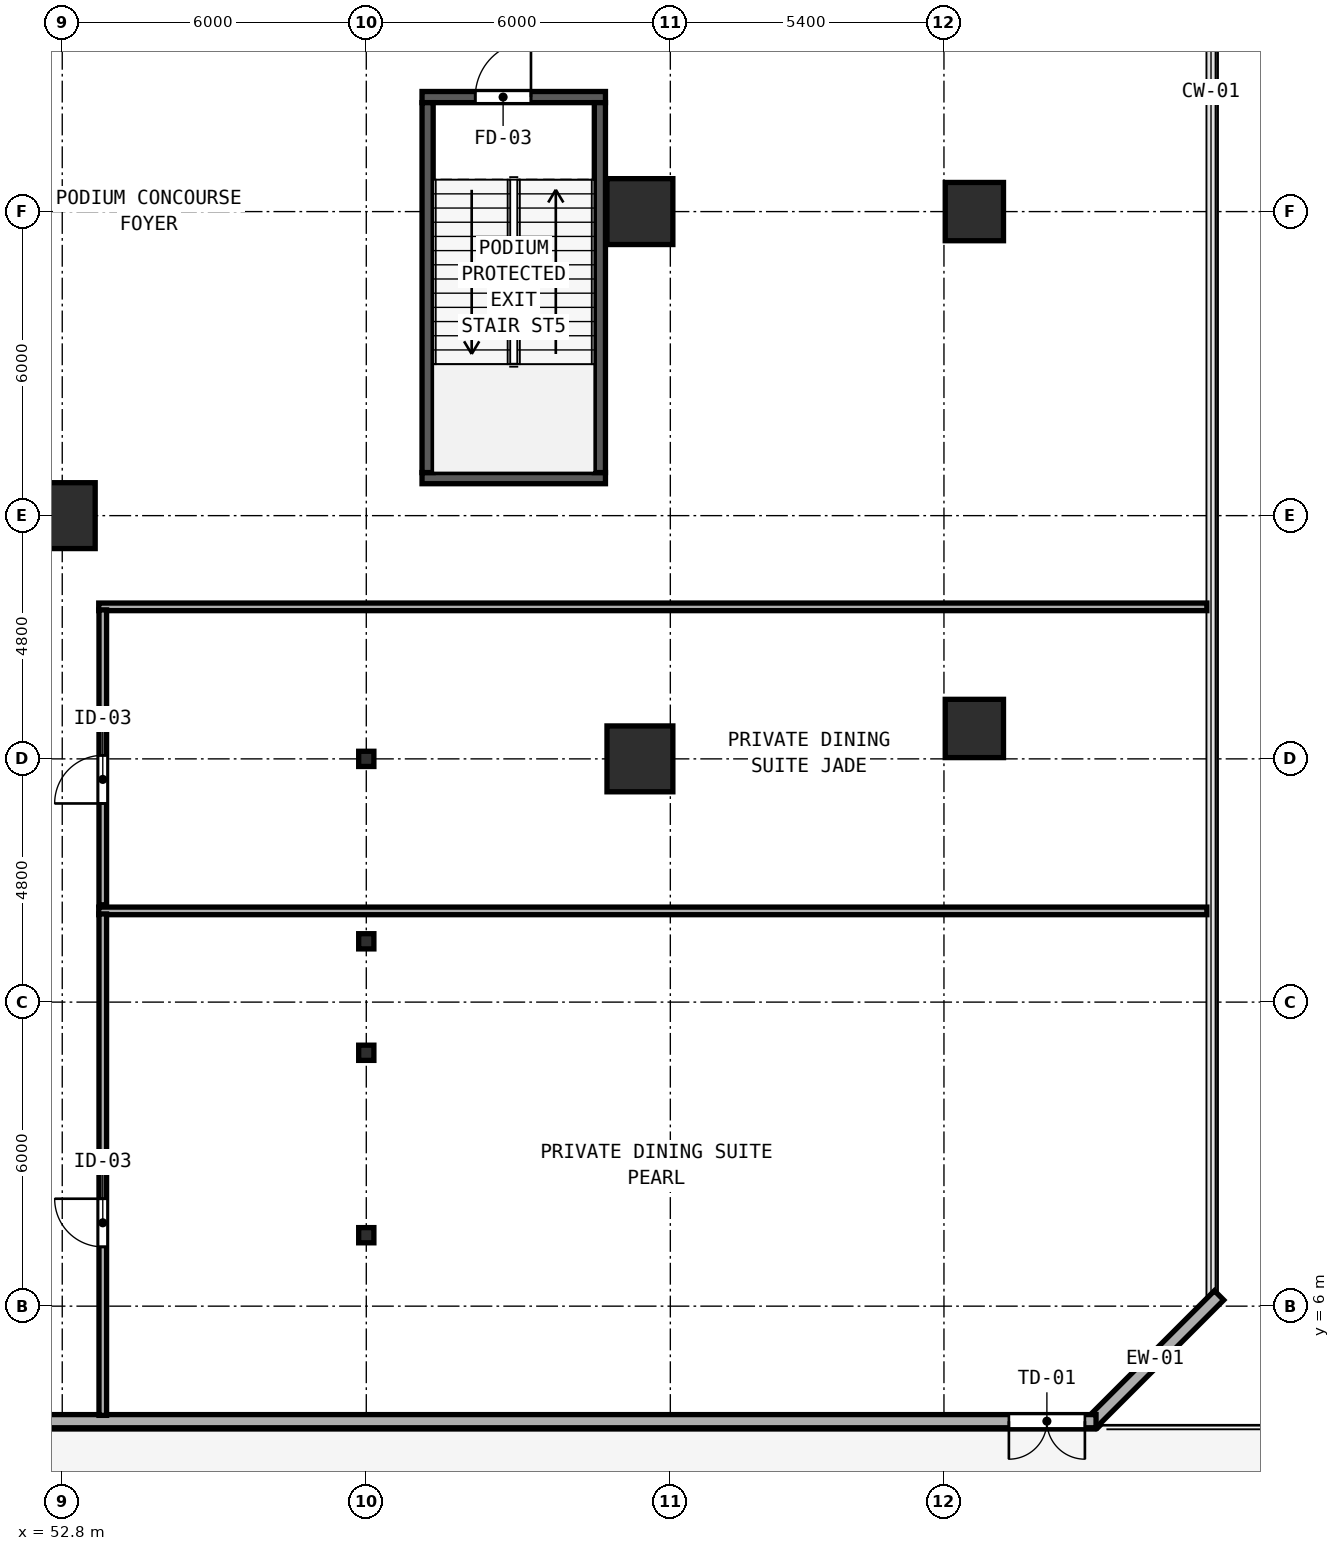
"""IFC4 building model, lengths in metres.
Left out: names, types, materials, properties, quantities, classifications, styles, units other than length and angle.
Written with IfcOpenShell. Run it as: python <this file> out.ifc"""

import sys

from ifc_helpers import new_model, si_unit, direction, frame, frame_2d, origin, origin_2d, place, context, subcontext, project, spatial, rectangle, hollow_rectangle, i_section, extrude, element, fill, save


model = new_model("IFC4")
c1 = context("Model", 3, precision=1e-05, world=origin(), true_north=direction((0.0, 1.0)))
c2 = subcontext(c1, "Body", "Model", "MODEL_VIEW")
j1 = project(units=[si_unit("LENGTHUNIT", "METRE"), si_unit("PLANEANGLEUNIT", "RADIAN")], contexts=[c1])
p1 = place(None, origin())
s1 = spatial("IfcSite", under=j1, at=p1, CompositionType="ELEMENT")
p2 = place(p1, origin())
s2 = spatial("IfcBuilding", under=s1, at=p2, CompositionType="ELEMENT")
p3 = place(p2, frame((0.0, 0.0, 5.4)))
s3 = spatial("IfcBuildingStorey", under=s2, at=p3, CompositionType="ELEMENT", Elevation=5.4)
p4 = place(p3, frame((59.9, 29.86, 0.0), z_axis=(0.0, 0.0, 1.0), x_axis=(1.0, 0.0, 0.0)))
e1 = element("IfcWall", 1, at=p4, inside=s3, PredefinedType="SHEAR", context=c2, shape_type="SweptSolid", body=[
    extrude(rectangle(XDim=3.62, YDim=0.22, at=frame_2d((1.81, 0.0))), origin(), (0.0, 0.0, 1.0), 4.56),
])
p5 = place(p4, frame((1.05, 0.0, 0.0)))
e2 = element("IfcOpeningElement", 2, at=p5, cuts=e1, PredefinedType="OPENING", context=c2, shape_type="SweptSolid", body=[
    extrude(rectangle(XDim=1.1, YDim=2.15, at=frame_2d((0.55, 1.075))), frame((0.0, 0.12, 0.0), z_axis=(0.0, -1.0, 0.0), x_axis=(1.0, 0.0, 0.0)), (0.0, 0.0, 1.0), 0.24),
])
p6 = place(p3, frame((59.9, 22.34, 0.0), z_axis=(0.0, 0.0, 1.0), x_axis=(1.0, 0.0, 0.0)))
e3 = element("IfcWall", 3, at=p6, inside=s3, PredefinedType="SHEAR", context=c2, shape_type="SweptSolid", body=[
    extrude(rectangle(XDim=3.62, YDim=0.22, at=frame_2d((1.81, 0.0))), origin(), (0.0, 0.0, 1.0), 4.56),
])
for number, where, z_axis, x_axis in (
    (4, (60.01, 22.45, 0.0), (0.0, 0.0, 1.0), (0.0, 1.0, 0.0)),
    (5, (63.41, 22.45, 0.0), (0.0, 0.0, 1.0), (0.0, 1.0, 0.0)),
):
    element("IfcWall", number, at=place(p3, frame(where, z_axis=z_axis, x_axis=x_axis)), inside=s3, PredefinedType="SHEAR", context=c2, shape_type="SweptSolid", body=[
        extrude(rectangle(XDim=7.3, YDim=0.22, at=frame_2d((3.65, 0.0))), origin(), (0.0, 0.0, 1.0), 4.56),
    ])
for number, where, z_axis, x_axis in (
    (6, (52.8, 21.6, 0.0), (0.0, 0.0, 1.0), (1.0, 0.0, 0.0)),
    (7, (64.2, 16.8, 0.0), (0.0, 0.0, 1.0), (1.0, 0.0, 0.0)),
    (8, (64.2, 27.6, 0.0), (0.0, 0.0, 1.0), (1.0, 0.0, 0.0)),
):
    element("IfcColumn", number, at=place(p3, frame(where, z_axis=z_axis, x_axis=x_axis)), inside=s3, PredefinedType="COLUMN", context=c2, shape_type="SweptSolid", body=[
        extrude(hollow_rectangle(XDim=1.3, YDim=1.3, WallThickness=0.048, at=origin_2d()), origin(), (0.0, 0.0, 1.0), 4.8),
    ])
for number, where, z_axis, x_axis in (
    (9, (70.8, 17.4, 0.0), (0.0, 0.0, 1.0), (1.0, 0.0, 0.0)),
    (10, (70.8, 27.6, 0.0), (0.0, 0.0, 1.0), (1.0, 0.0, 0.0)),
):
    element("IfcColumn", number, at=place(p3, frame(where, z_axis=z_axis, x_axis=x_axis)), inside=s3, PredefinedType="COLUMN", context=c2, shape_type="SweptSolid", body=[
        extrude(hollow_rectangle(XDim=1.15, YDim=1.15, WallThickness=0.042, at=origin_2d()), origin(), (0.0, 0.0, 1.0), 4.8),
    ])
for number, where, z_axis, x_axis in (
    (11, (58.8, 7.4, 0.0), (0.0, 0.0, 1.0), (1.0, 0.0, 0.0)),
    (12, (58.8, 11.0, 0.0), (0.0, 0.0, 1.0), (1.0, 0.0, 0.0)),
    (13, (58.8, 13.2, 0.0), (0.0, 0.0, 1.0), (1.0, 0.0, 0.0)),
    (14, (58.8, 16.8, 0.0), (0.0, 0.0, 1.0), (1.0, 0.0, 0.0)),
):
    element("IfcColumn", number, at=place(p3, frame(where, z_axis=z_axis, x_axis=x_axis)), inside=s3, PredefinedType="COLUMN", context=c2, shape_type="SweptSolid", body=[
        extrude(i_section(OverallWidth=0.3, OverallDepth=0.3, WebThickness=0.01, FlangeThickness=0.015, FilletRadius=0.018, at=origin_2d()), origin(), (0.0, 0.0, 1.0), 4.8),
    ])
p7 = place(p3, frame((73.107, 3.691, 0.0), z_axis=(0.0, 0.0, 1.0), x_axis=(0.707106781187, 0.707106781187, 0.0)))
e15 = element("IfcWall", 15, at=p7, inside=s3, PredefinedType="SOLIDWALL", context=c2, shape_type="SweptSolid", body=[
    extrude(rectangle(XDim=3.566, YDim=0.26, at=frame_2d((1.783, 0.0))), origin(), (0.0, 0.0, 1.0), 4.56),
])
p8 = place(p3, frame((3.599, 3.73, 0.0), z_axis=(0.0, 0.0, 1.0), x_axis=(1.0, 0.0, 0.0)))
e16 = element("IfcWall", 16, at=p8, inside=s3, PredefinedType="SOLIDWALL", context=c2, shape_type="SweptSolid", body=[
    extrude(rectangle(XDim=69.602, YDim=0.26, at=frame_2d((34.801, 0.0))), origin(), (0.0, 0.0, 1.0), 4.56),
])
p9 = place(p8, frame((69.382, 0.0, 0.0), z_axis=(0.0, 0.0, 1.0), x_axis=(-1.0, 0.0, 0.0)))
e17 = element("IfcOpeningElement", 17, at=p9, cuts=e16, PredefinedType="OPENING", context=c2, shape_type="SweptSolid", body=[
    extrude(rectangle(XDim=1.5, YDim=2.2, at=frame_2d((0.75, 1.1))), frame((0.0, 0.14, 0.0), z_axis=(0.0, -1.0, 0.0), x_axis=(1.0, 0.0, 0.0)), (0.0, 0.0, 1.0), 0.28),
])
p10 = place(p3, frame((53.52, 13.8, 0.0), z_axis=(0.0, 0.0, 1.0), x_axis=(1.0, 0.0, 0.0)))
e18 = element("IfcWall", 18, at=p10, inside=s3, PredefinedType="PARTITIONING", context=c2, shape_type="SweptSolid", body=[
    extrude(rectangle(XDim=21.868, YDim=0.15, at=frame_2d((10.934, 0.0))), origin(), (0.0, 0.0, 1.0), 4.56),
])
p11 = place(p3, frame((53.6, 3.845, 0.0), z_axis=(0.0, 0.0, 1.0), x_axis=(0.0, 1.0, 0.0)))
e19 = element("IfcWall", 19, at=p11, inside=s3, PredefinedType="PARTITIONING", context=c2, shape_type="SweptSolid", body=[
    extrude(rectangle(XDim=9.895, YDim=0.15, at=frame_2d((4.948, 0.0))), origin(), (0.0, 0.0, 1.0), 4.56),
])
p12 = place(p11, frame((3.325, 0.0, 0.0)))
e20 = element("IfcOpeningElement", 20, at=p12, cuts=e19, PredefinedType="OPENING", context=c2, shape_type="SweptSolid", body=[
    extrude(rectangle(XDim=0.95, YDim=2.12, at=frame_2d((0.475, 1.06))), frame((0.0, 0.085, 0.0), z_axis=(0.0, -1.0, 0.0), x_axis=(1.0, 0.0, 0.0)), (0.0, 0.0, 1.0), 0.17),
])
p13 = place(p3, frame((53.52, 19.8, 0.0), z_axis=(0.0, 0.0, 1.0), x_axis=(1.0, 0.0, 0.0)))
e21 = element("IfcWall", 21, at=p13, inside=s3, PredefinedType="PARTITIONING", context=c2, shape_type="SweptSolid", body=[
    extrude(rectangle(XDim=21.868, YDim=0.15, at=frame_2d((10.934, 0.0))), origin(), (0.0, 0.0, 1.0), 4.56),
])
p14 = place(p3, frame((53.6, 13.92, 0.0), z_axis=(0.0, 0.0, 1.0), x_axis=(0.0, 1.0, 0.0)))
e22 = element("IfcWall", 22, at=p14, inside=s3, PredefinedType="PARTITIONING", context=c2, shape_type="SweptSolid", body=[
    extrude(rectangle(XDim=5.82, YDim=0.15, at=frame_2d((2.91, 0.0))), origin(), (0.0, 0.0, 1.0), 4.56),
])
p15 = place(p14, frame((2.0, 0.0, 0.0)))
e23 = element("IfcOpeningElement", 23, at=p15, cuts=e22, PredefinedType="OPENING", context=c2, shape_type="SweptSolid", body=[
    extrude(rectangle(XDim=0.95, YDim=2.12, at=frame_2d((0.475, 1.06))), frame((0.0, 0.085, 0.0), z_axis=(0.0, -1.0, 0.0), x_axis=(1.0, 0.0, 0.0)), (0.0, 0.0, 1.0), 0.17),
])
p16 = place(p9, origin())
e24 = element("IfcDoor", 24, at=p16, inside=s3, OperationType="DOUBLE_DOOR_SINGLE_SWING", PredefinedType="DOOR", context=c2, shape_type="SweptSolid", body=[
    extrude(rectangle(XDim=1.5, YDim=2.2, at=frame_2d((0.75, 1.1))), frame((0.0, 0.025, 0.0), z_axis=(0.0, -1.0, 0.0), x_axis=(1.0, 0.0, 0.0)), (0.0, 0.0, 1.0), 0.05),
])
fill(e17, e24)
p17 = place(p5, origin())
e25 = element("IfcDoor", 25, at=p17, inside=s3, OperationType="SINGLE_SWING_RIGHT", PredefinedType="DOOR", context=c2, shape_type="SweptSolid", body=[
    extrude(rectangle(XDim=1.1, YDim=2.15, at=frame_2d((0.55, 1.075))), frame((0.0, 0.025, 0.0), z_axis=(0.0, -1.0, 0.0), x_axis=(1.0, 0.0, 0.0)), (0.0, 0.0, 1.0), 0.05),
])
fill(e2, e25)
p18 = place(p12, origin())
e26 = element("IfcDoor", 26, at=p18, inside=s3, OperationType="SINGLE_SWING_RIGHT", PredefinedType="DOOR", context=c2, shape_type="SweptSolid", body=[
    extrude(rectangle(XDim=0.95, YDim=2.12, at=frame_2d((0.475, 1.06))), frame((0.0, 0.025, 0.0), z_axis=(0.0, -1.0, 0.0), x_axis=(1.0, 0.0, 0.0)), (0.0, 0.0, 1.0), 0.05),
])
fill(e20, e26)
p19 = place(p15, origin())
e27 = element("IfcDoor", 27, at=p19, inside=s3, OperationType="SINGLE_SWING_LEFT", PredefinedType="DOOR", context=c2, shape_type="SweptSolid", body=[
    extrude(rectangle(XDim=0.95, YDim=2.12, at=frame_2d((0.475, 1.06))), frame((0.0, 0.025, 0.0), z_axis=(0.0, -1.0, 0.0), x_axis=(1.0, 0.0, 0.0)), (0.0, 0.0, 1.0), 0.05),
])
fill(e23, e27)
save(model, sys.argv[1])
